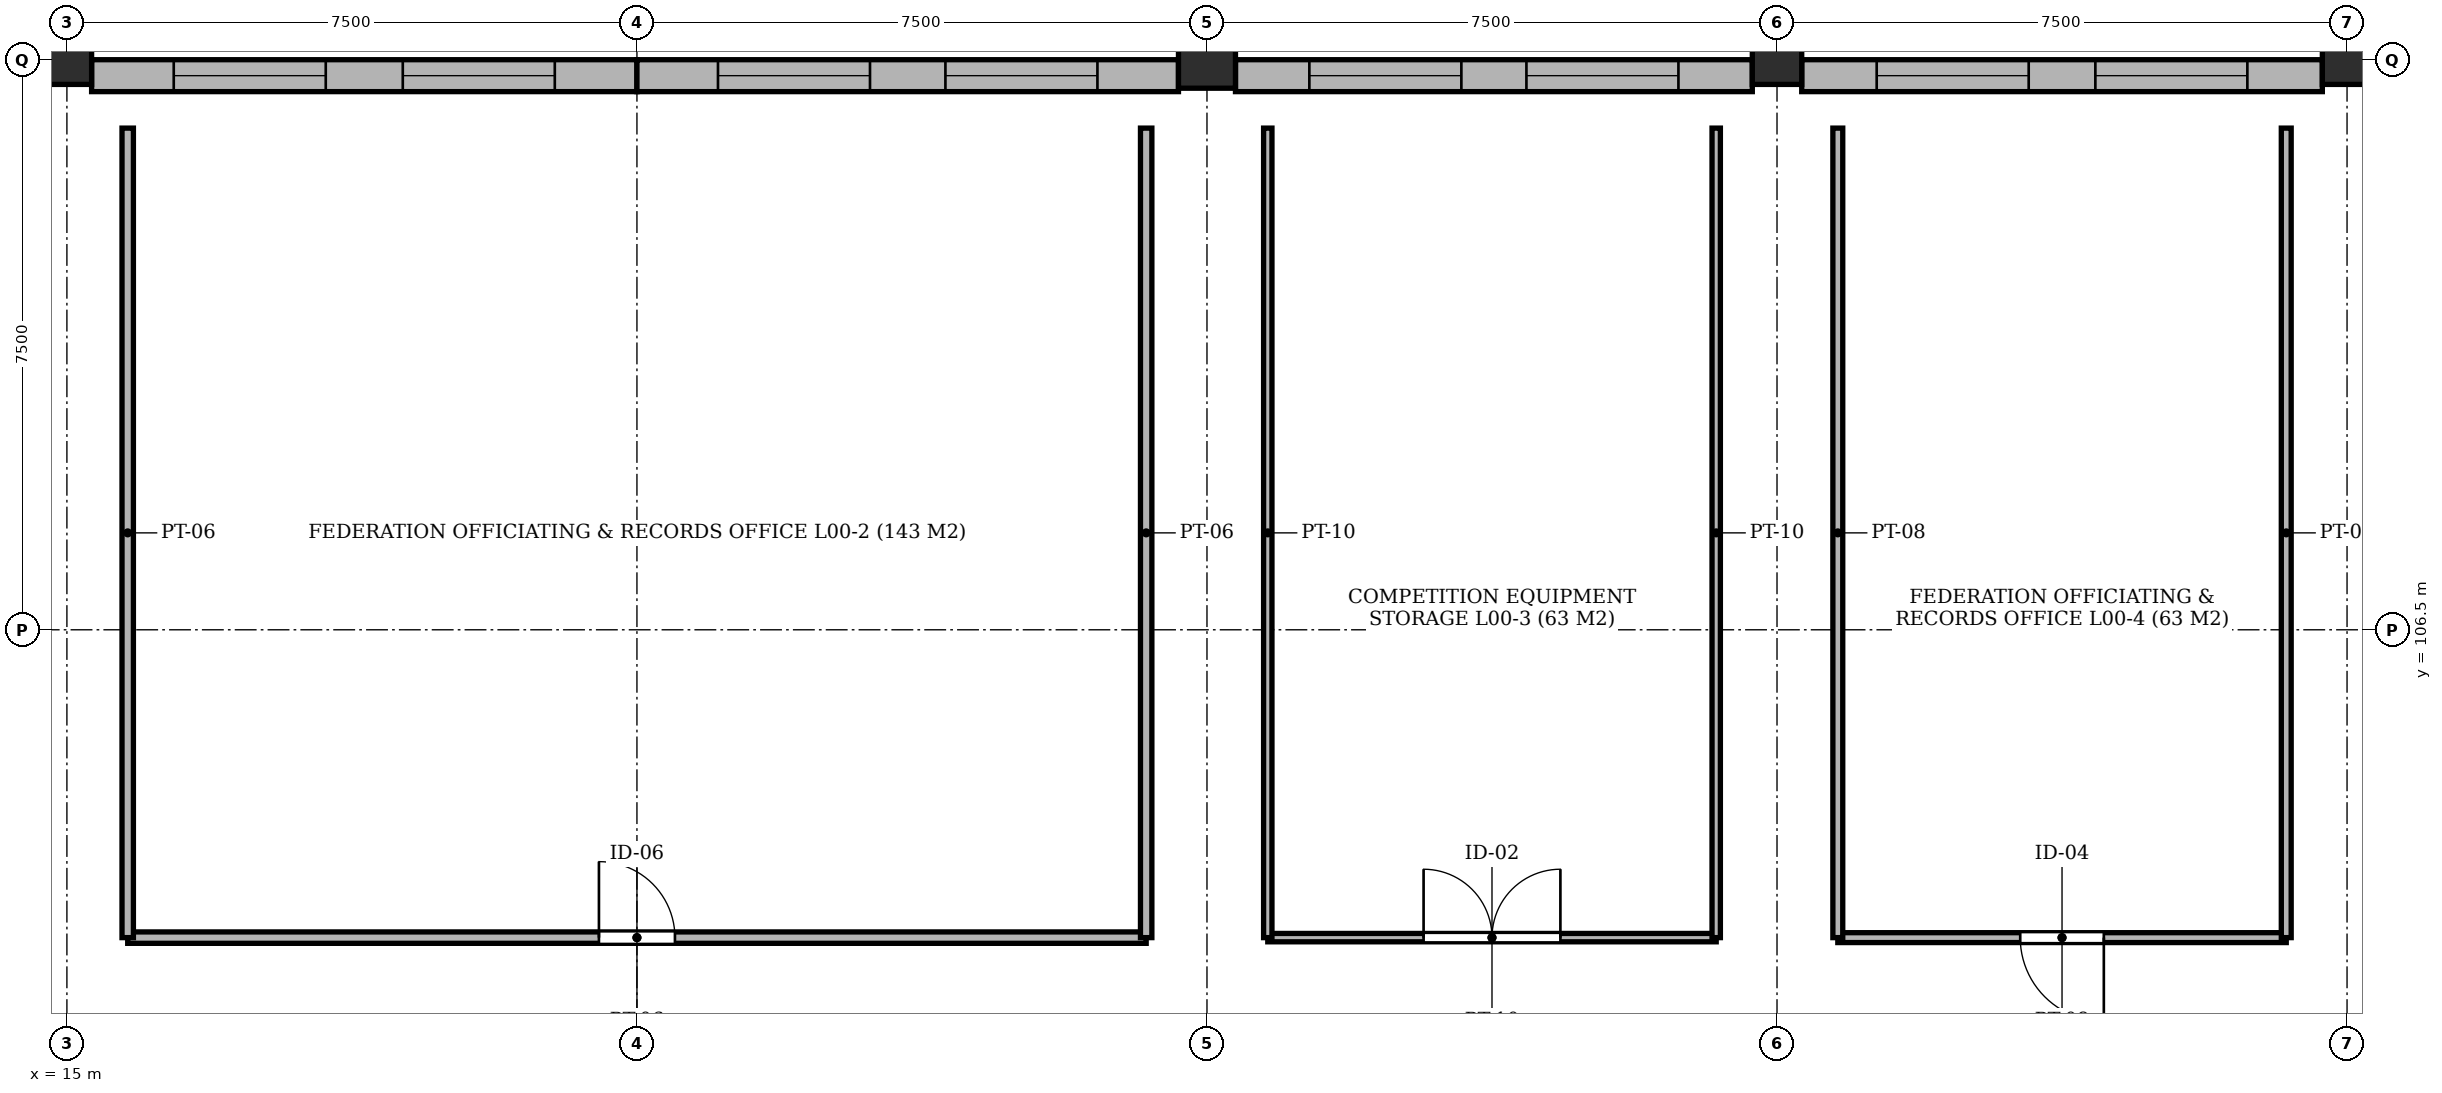
"""IFC4 building model, lengths in metres.
Left out: names, types, materials, properties, quantities, classifications, styles, units other than length and angle.
Written with IfcOpenShell. Run it as: python <this file> out.ifc"""

import sys

from ifc_helpers import new_model, si_unit, direction, frame, frame_2d, origin, origin_2d, place, context, subcontext, project, spatial, rectangle, extrude, element, fill, save


model = new_model("IFC4")
c1 = context("Model", 3, precision=1e-05, world=origin(), true_north=direction((0.0, 1.0)))
c2 = subcontext(c1, "Body", "Model", "MODEL_VIEW")
j1 = project(units=[si_unit("LENGTHUNIT", "METRE"), si_unit("PLANEANGLEUNIT", "RADIAN")], contexts=[c1])
p1 = place(None, origin())
s1 = spatial("IfcSite", under=j1, at=p1, CompositionType="ELEMENT")
p2 = place(p1, origin())
s2 = spatial("IfcBuilding", under=s1, at=p2, CompositionType="ELEMENT")
p3 = place(p2, origin())
s3 = spatial("IfcBuildingStorey", under=s2, at=p3, CompositionType="ELEMENT", Elevation=0.0)
p4 = place(p3, frame((15.0, 114.0, -0.35), z_axis=(0.0, 0.0, 1.0), x_axis=(1.0, 0.0, 0.0)))
e1 = element("IfcColumn", 1, at=p4, inside=s3, PredefinedType="COLUMN", context=c2, shape_type="SweptSolid", body=[
    extrude(rectangle(XDim=0.65, YDim=0.65, at=origin_2d()), origin(), (0.0, 0.0, 1.0), 4.65),
])
p5 = place(p3, frame((30.0, 114.0, -0.35), z_axis=(0.0, 0.0, 1.0), x_axis=(1.0, 0.0, 0.0)))
e2 = element("IfcColumn", 2, at=p5, inside=s3, PredefinedType="COLUMN", context=c2, shape_type="SweptSolid", body=[
    extrude(rectangle(XDim=0.75, YDim=0.75, at=origin_2d()), origin(), (0.0, 0.0, 1.0), 4.65),
])
for number, where, z_axis, x_axis in (
    (3, (37.5, 114.0, -0.35), (0.0, 0.0, 1.0), (1.0, 0.0, 0.0)),
    (4, (45.0, 114.0, -0.35), (0.0, 0.0, 1.0), (1.0, 0.0, 0.0)),
):
    element("IfcColumn", number, at=place(p3, frame(where, z_axis=z_axis, x_axis=x_axis)), inside=s3, PredefinedType="COLUMN", context=c2, shape_type="SweptSolid", body=[
        extrude(rectangle(XDim=0.65, YDim=0.65, at=origin_2d()), origin(), (0.0, 0.0, 1.0), 4.65),
    ])
p6 = place(p3, frame((22.5, 113.79, 0.0), z_axis=(0.0, 0.0, 1.0), x_axis=(-1.0, 0.0, 0.0)))
e5 = element("IfcWall", 5, at=p6, inside=s3, PredefinedType="SOLIDWALL", context=c2, shape_type="SweptSolid", body=[
    extrude(rectangle(XDim=7.175, YDim=0.42, at=frame_2d((3.587, 0.0))), origin(), (0.0, 0.0, 1.0), 3.45),
])
p7 = place(p6, frame((4.094, 0.0, 0.92)))
e6 = element("IfcOpeningElement", 6, at=p7, cuts=e5, PredefinedType="OPENING", context=c2, shape_type="SweptSolid", body=[
    extrude(rectangle(XDim=2.0, YDim=1.89, at=frame_2d((1.0, 0.945))), frame((0.0, 0.222, 0.0), z_axis=(0.0, -1.0, 0.0), x_axis=(1.0, 0.0, 0.0)), (0.0, 0.0, 1.0), 0.444),
])
p8 = place(p6, frame((1.081, 0.0, 0.92)))
e7 = element("IfcOpeningElement", 7, at=p8, cuts=e5, PredefinedType="OPENING", context=c2, shape_type="SweptSolid", body=[
    extrude(rectangle(XDim=2.0, YDim=1.89, at=frame_2d((1.0, 0.945))), frame((0.0, 0.222, 0.0), z_axis=(0.0, -1.0, 0.0), x_axis=(1.0, 0.0, 0.0)), (0.0, 0.0, 1.0), 0.444),
])
p9 = place(p3, frame((29.625, 113.79, 0.0), z_axis=(0.0, 0.0, 1.0), x_axis=(-1.0, 0.0, 0.0)))
e8 = element("IfcWall", 8, at=p9, inside=s3, PredefinedType="SOLIDWALL", context=c2, shape_type="SweptSolid", body=[
    extrude(rectangle(XDim=7.125, YDim=0.42, at=frame_2d((3.562, 0.0))), origin(), (0.0, 0.0, 1.0), 3.45),
])
p10 = place(p9, frame((4.059, 0.0, 0.92)))
e9 = element("IfcOpeningElement", 9, at=p10, cuts=e8, PredefinedType="OPENING", context=c2, shape_type="SweptSolid", body=[
    extrude(rectangle(XDim=2.0, YDim=1.89, at=frame_2d((1.0, 0.945))), frame((0.0, 0.222, 0.0), z_axis=(0.0, -1.0, 0.0), x_axis=(1.0, 0.0, 0.0)), (0.0, 0.0, 1.0), 0.444),
])
p11 = place(p9, frame((1.066, 0.0, 0.92)))
e10 = element("IfcOpeningElement", 10, at=p11, cuts=e8, PredefinedType="OPENING", context=c2, shape_type="SweptSolid", body=[
    extrude(rectangle(XDim=2.0, YDim=1.89, at=frame_2d((1.0, 0.945))), frame((0.0, 0.222, 0.0), z_axis=(0.0, -1.0, 0.0), x_axis=(1.0, 0.0, 0.0)), (0.0, 0.0, 1.0), 0.444),
])
p12 = place(p3, frame((37.175, 113.79, 0.0), z_axis=(0.0, 0.0, 1.0), x_axis=(-1.0, 0.0, 0.0)))
e11 = element("IfcWall", 11, at=p12, inside=s3, PredefinedType="SOLIDWALL", context=c2, shape_type="SweptSolid", body=[
    extrude(rectangle(XDim=6.8, YDim=0.42, at=frame_2d((3.4, 0.0))), origin(), (0.0, 0.0, 1.0), 3.82),
])
p13 = place(p12, frame((3.828, 0.0, 0.92)))
e12 = element("IfcOpeningElement", 12, at=p13, cuts=e11, PredefinedType="OPENING", context=c2, shape_type="SweptSolid", body=[
    extrude(rectangle(XDim=2.0, YDim=1.89, at=frame_2d((1.0, 0.945))), frame((0.0, 0.222, 0.0), z_axis=(0.0, -1.0, 0.0), x_axis=(1.0, 0.0, 0.0)), (0.0, 0.0, 1.0), 0.444),
])
p14 = place(p12, frame((0.972, 0.0, 0.92)))
e13 = element("IfcOpeningElement", 13, at=p14, cuts=e11, PredefinedType="OPENING", context=c2, shape_type="SweptSolid", body=[
    extrude(rectangle(XDim=2.0, YDim=1.89, at=frame_2d((1.0, 0.945))), frame((0.0, 0.222, 0.0), z_axis=(0.0, -1.0, 0.0), x_axis=(1.0, 0.0, 0.0)), (0.0, 0.0, 1.0), 0.444),
])
p15 = place(p3, frame((44.675, 113.79, 0.0), z_axis=(0.0, 0.0, 1.0), x_axis=(-1.0, 0.0, 0.0)))
e14 = element("IfcWall", 14, at=p15, inside=s3, PredefinedType="SOLIDWALL", context=c2, shape_type="SweptSolid", body=[
    extrude(rectangle(XDim=6.85, YDim=0.42, at=frame_2d((3.425, 0.0))), origin(), (0.0, 0.0, 1.0), 3.82),
])
p16 = place(p15, frame((3.864, 0.0, 0.92)))
e15 = element("IfcOpeningElement", 15, at=p16, cuts=e14, PredefinedType="OPENING", context=c2, shape_type="SweptSolid", body=[
    extrude(rectangle(XDim=2.0, YDim=1.89, at=frame_2d((1.0, 0.945))), frame((0.0, 0.222, 0.0), z_axis=(0.0, -1.0, 0.0), x_axis=(1.0, 0.0, 0.0)), (0.0, 0.0, 1.0), 0.444),
])
p17 = place(p15, frame((0.987, 0.0, 0.92)))
e16 = element("IfcOpeningElement", 16, at=p17, cuts=e14, PredefinedType="OPENING", context=c2, shape_type="SweptSolid", body=[
    extrude(rectangle(XDim=2.0, YDim=1.89, at=frame_2d((1.0, 0.945))), frame((0.0, 0.222, 0.0), z_axis=(0.0, -1.0, 0.0), x_axis=(1.0, 0.0, 0.0)), (0.0, 0.0, 1.0), 0.444),
])
p18 = place(p3, frame((15.8, 102.45, 0.0), z_axis=(0.0, 0.0, 1.0), x_axis=(1.0, 0.0, 0.0)))
e17 = element("IfcWall", 17, at=p18, inside=s3, PredefinedType="PARTITIONING", context=c2, shape_type="SweptSolid", body=[
    extrude(rectangle(XDim=13.4, YDim=0.15, at=frame_2d((6.7, 0.0))), origin(), (0.0, 0.0, 1.0), 3.88),
])
p19 = place(p18, frame((6.2, 0.0, 0.0)))
e18 = element("IfcOpeningElement", 18, at=p19, cuts=e17, PredefinedType="OPENING", context=c2, shape_type="SweptSolid", body=[
    extrude(rectangle(XDim=1.0, YDim=2.15, at=frame_2d((0.5, 1.075))), frame((0.0, 0.087, 0.0), z_axis=(0.0, -1.0, 0.0), x_axis=(1.0, 0.0, 0.0)), (0.0, 0.0, 1.0), 0.174),
])
for number, where, z_axis, x_axis in (
    (19, (15.8, 102.45, 0.0), (0.0, 0.0, 1.0), (0.0, 1.0, 0.0)),
    (20, (29.2, 102.45, 0.0), (0.0, 0.0, 1.0), (0.0, 1.0, 0.0)),
):
    element("IfcWall", number, at=place(p3, frame(where, z_axis=z_axis, x_axis=x_axis)), inside=s3, PredefinedType="PARTITIONING", context=c2, shape_type="SweptSolid", body=[
        extrude(rectangle(XDim=10.65, YDim=0.15, at=frame_2d((5.325, 0.0))), origin(), (0.0, 0.0, 1.0), 3.88),
    ])
p20 = place(p3, frame((30.8, 102.45, 0.0), z_axis=(0.0, 0.0, 1.0), x_axis=(1.0, 0.0, 0.0)))
e21 = element("IfcWall", 21, at=p20, inside=s3, PredefinedType="PARTITIONING", context=c2, shape_type="SweptSolid", body=[
    extrude(rectangle(XDim=5.9, YDim=0.11, at=frame_2d((2.95, 0.0))), origin(), (0.0, 0.0, 1.0), 3.88),
])
p21 = place(p20, frame((2.05, 0.0, 0.0)))
e22 = element("IfcOpeningElement", 22, at=p21, cuts=e21, PredefinedType="OPENING", context=c2, shape_type="SweptSolid", body=[
    extrude(rectangle(XDim=1.8, YDim=2.25, at=frame_2d((0.9, 1.125))), frame((0.0, 0.067, 0.0), z_axis=(0.0, -1.0, 0.0), x_axis=(1.0, 0.0, 0.0)), (0.0, 0.0, 1.0), 0.134),
])
for number, where, z_axis, x_axis in (
    (23, (30.8, 102.45, 0.0), (0.0, 0.0, 1.0), (0.0, 1.0, 0.0)),
    (24, (36.7, 102.45, 0.0), (0.0, 0.0, 1.0), (0.0, 1.0, 0.0)),
):
    element("IfcWall", number, at=place(p3, frame(where, z_axis=z_axis, x_axis=x_axis)), inside=s3, PredefinedType="PARTITIONING", context=c2, shape_type="SweptSolid", body=[
        extrude(rectangle(XDim=10.65, YDim=0.11, at=frame_2d((5.325, 0.0))), origin(), (0.0, 0.0, 1.0), 3.88),
    ])
p22 = place(p3, frame((38.3, 102.45, 0.0), z_axis=(0.0, 0.0, 1.0), x_axis=(1.0, 0.0, 0.0)))
e25 = element("IfcWall", 25, at=p22, inside=s3, PredefinedType="PARTITIONING", context=c2, shape_type="SweptSolid", body=[
    extrude(rectangle(XDim=5.9, YDim=0.13, at=frame_2d((2.95, 0.0))), origin(), (0.0, 0.0, 1.0), 3.88),
])
p23 = place(p22, frame((2.4, 0.0, 0.0)))
e26 = element("IfcOpeningElement", 26, at=p23, cuts=e25, PredefinedType="OPENING", context=c2, shape_type="SweptSolid", body=[
    extrude(rectangle(XDim=1.1, YDim=2.15, at=frame_2d((0.55, 1.075))), frame((0.0, 0.077, 0.0), z_axis=(0.0, -1.0, 0.0), x_axis=(1.0, 0.0, 0.0)), (0.0, 0.0, 1.0), 0.154),
])
for number, where, z_axis, x_axis in (
    (27, (38.3, 102.45, 0.0), (0.0, 0.0, 1.0), (0.0, 1.0, 0.0)),
    (28, (44.2, 102.45, 0.0), (0.0, 0.0, 1.0), (0.0, 1.0, 0.0)),
):
    element("IfcWall", number, at=place(p3, frame(where, z_axis=z_axis, x_axis=x_axis)), inside=s3, PredefinedType="PARTITIONING", context=c2, shape_type="SweptSolid", body=[
        extrude(rectangle(XDim=10.65, YDim=0.13, at=frame_2d((5.325, 0.0))), origin(), (0.0, 0.0, 1.0), 3.88),
    ])
p24 = place(p7, origin())
e29 = element("IfcWindow", 29, at=p24, inside=s3, PartitioningType="SINGLE_PANEL", PredefinedType="WINDOW", context=c2, shape_type="SweptSolid", body=[
    extrude(rectangle(XDim=2.0, YDim=1.89, at=frame_2d((1.0, 0.945))), frame((0.0, 0.03, 0.0), z_axis=(0.0, -1.0, 0.0), x_axis=(1.0, 0.0, 0.0)), (0.0, 0.0, 1.0), 0.06),
])
fill(e6, e29)
p25 = place(p8, origin())
e30 = element("IfcWindow", 30, at=p25, inside=s3, PartitioningType="SINGLE_PANEL", PredefinedType="WINDOW", context=c2, shape_type="SweptSolid", body=[
    extrude(rectangle(XDim=2.0, YDim=1.89, at=frame_2d((1.0, 0.945))), frame((0.0, 0.03, 0.0), z_axis=(0.0, -1.0, 0.0), x_axis=(1.0, 0.0, 0.0)), (0.0, 0.0, 1.0), 0.06),
])
fill(e7, e30)
p26 = place(p10, origin())
e31 = element("IfcWindow", 31, at=p26, inside=s3, PartitioningType="SINGLE_PANEL", PredefinedType="WINDOW", context=c2, shape_type="SweptSolid", body=[
    extrude(rectangle(XDim=2.0, YDim=1.89, at=frame_2d((1.0, 0.945))), frame((0.0, 0.03, 0.0), z_axis=(0.0, -1.0, 0.0), x_axis=(1.0, 0.0, 0.0)), (0.0, 0.0, 1.0), 0.06),
])
fill(e9, e31)
p27 = place(p11, origin())
e32 = element("IfcWindow", 32, at=p27, inside=s3, PartitioningType="SINGLE_PANEL", PredefinedType="WINDOW", context=c2, shape_type="SweptSolid", body=[
    extrude(rectangle(XDim=2.0, YDim=1.89, at=frame_2d((1.0, 0.945))), frame((0.0, 0.03, 0.0), z_axis=(0.0, -1.0, 0.0), x_axis=(1.0, 0.0, 0.0)), (0.0, 0.0, 1.0), 0.06),
])
fill(e10, e32)
p28 = place(p13, origin())
e33 = element("IfcWindow", 33, at=p28, inside=s3, PartitioningType="SINGLE_PANEL", PredefinedType="WINDOW", context=c2, shape_type="SweptSolid", body=[
    extrude(rectangle(XDim=2.0, YDim=1.89, at=frame_2d((1.0, 0.945))), frame((0.0, 0.03, 0.0), z_axis=(0.0, -1.0, 0.0), x_axis=(1.0, 0.0, 0.0)), (0.0, 0.0, 1.0), 0.06),
])
fill(e12, e33)
p29 = place(p14, origin())
e34 = element("IfcWindow", 34, at=p29, inside=s3, PartitioningType="SINGLE_PANEL", PredefinedType="WINDOW", context=c2, shape_type="SweptSolid", body=[
    extrude(rectangle(XDim=2.0, YDim=1.89, at=frame_2d((1.0, 0.945))), frame((0.0, 0.03, 0.0), z_axis=(0.0, -1.0, 0.0), x_axis=(1.0, 0.0, 0.0)), (0.0, 0.0, 1.0), 0.06),
])
fill(e13, e34)
p30 = place(p16, origin())
e35 = element("IfcWindow", 35, at=p30, inside=s3, PartitioningType="SINGLE_PANEL", PredefinedType="WINDOW", context=c2, shape_type="SweptSolid", body=[
    extrude(rectangle(XDim=2.0, YDim=1.89, at=frame_2d((1.0, 0.945))), frame((0.0, 0.03, 0.0), z_axis=(0.0, -1.0, 0.0), x_axis=(1.0, 0.0, 0.0)), (0.0, 0.0, 1.0), 0.06),
])
fill(e15, e35)
p31 = place(p17, origin())
e36 = element("IfcWindow", 36, at=p31, inside=s3, PartitioningType="SINGLE_PANEL", PredefinedType="WINDOW", context=c2, shape_type="SweptSolid", body=[
    extrude(rectangle(XDim=2.0, YDim=1.89, at=frame_2d((1.0, 0.945))), frame((0.0, 0.03, 0.0), z_axis=(0.0, -1.0, 0.0), x_axis=(1.0, 0.0, 0.0)), (0.0, 0.0, 1.0), 0.06),
])
fill(e16, e36)
p32 = place(p19, origin())
e37 = element("IfcDoor", 37, at=p32, inside=s3, OperationType="SINGLE_SWING_LEFT", PredefinedType="DOOR", context=c2, shape_type="SweptSolid", body=[
    extrude(rectangle(XDim=1.0, YDim=2.15, at=frame_2d((0.5, 1.075))), frame((0.0, 0.025, 0.0), z_axis=(0.0, -1.0, 0.0), x_axis=(1.0, 0.0, 0.0)), (0.0, 0.0, 1.0), 0.05),
])
fill(e18, e37)
p33 = place(p21, origin())
e38 = element("IfcDoor", 38, at=p33, inside=s3, OperationType="DOUBLE_DOOR_SINGLE_SWING", PredefinedType="DOOR", context=c2, shape_type="SweptSolid", body=[
    extrude(rectangle(XDim=1.8, YDim=2.25, at=frame_2d((0.9, 1.125))), frame((0.0, 0.025, 0.0), z_axis=(0.0, -1.0, 0.0), x_axis=(1.0, 0.0, 0.0)), (0.0, 0.0, 1.0), 0.05),
])
fill(e22, e38)
p34 = place(p23, frame((1.1, 0.0, 0.0), z_axis=(0.0, 0.0, 1.0), x_axis=(-1.0, 0.0, 0.0)))
e39 = element("IfcDoor", 39, at=p34, inside=s3, OperationType="SINGLE_SWING_RIGHT", PredefinedType="DOOR", context=c2, shape_type="SweptSolid", body=[
    extrude(rectangle(XDim=1.1, YDim=2.15, at=frame_2d((0.55, 1.075))), frame((0.0, 0.025, 0.0), z_axis=(0.0, -1.0, 0.0), x_axis=(1.0, 0.0, 0.0)), (0.0, 0.0, 1.0), 0.05),
])
fill(e26, e39)
save(model, sys.argv[1])
